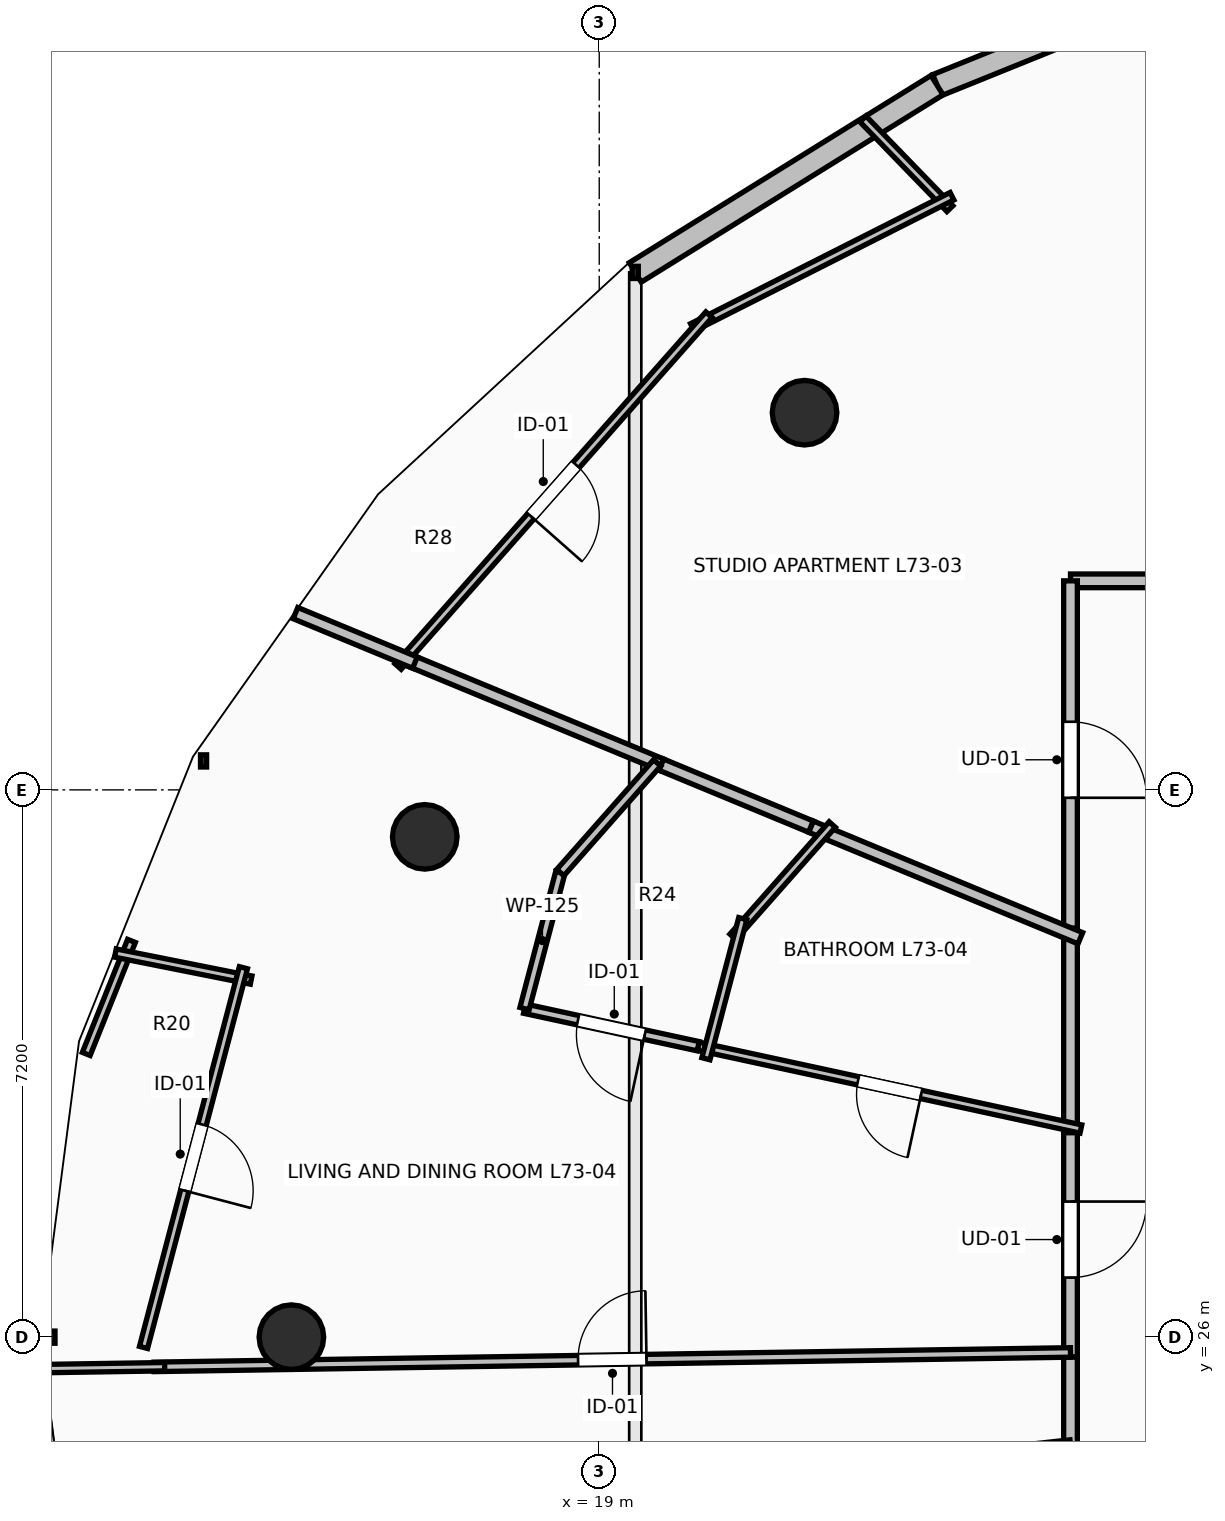
"""IFC4 building model, lengths in metres.
Left out: names, types, materials, properties, quantities, classifications, styles, units other than length and angle.
Written with IfcOpenShell. Run it as: python <this file> out.ifc"""

import sys

from ifc_helpers import new_model, si_unit, direction, frame, frame_2d, origin, origin_2d, place, context, subcontext, project, spatial, rectangle, circle, extrude, element, fill, save


model = new_model("IFC4")
c1 = context("Model", 3, precision=1e-05, world=origin(), true_north=direction((0.0, 1.0)))
c2 = subcontext(c1, "Body", "Model", "MODEL_VIEW")
j1 = project(units=[si_unit("LENGTHUNIT", "METRE"), si_unit("PLANEANGLEUNIT", "RADIAN")], contexts=[c1])
p1 = place(None, origin())
s1 = spatial("IfcSite", under=j1, at=p1, CompositionType="ELEMENT")
p2 = place(p1, origin())
s2 = spatial("IfcBuilding", under=s1, at=p2, CompositionType="ELEMENT")
p3 = place(p2, frame((0.0, 0.0, 269.75)))
s3 = spatial("IfcBuildingStorey", under=s2, at=p3, CompositionType="ELEMENT", Elevation=269.75)
for number, where, z_axis, x_axis in (
    (1, (21.701, 38.162, 0.0), (0.0, 0.0, 1.0), (-0.707, 0.707, 0.0)),
    (2, (16.705, 32.582, 0.0), (0.0, 0.0, 1.0), (-0.924, 0.383, 0.0)),
    (3, (14.95, 26.0, 0.0), (0.0, 0.0, 1.0), (-1.0, 0.0, 0.0)),
):
    element("IfcColumn", number, at=place(p3, frame(where, z_axis=z_axis, x_axis=x_axis)), inside=s3, PredefinedType="COLUMN", context=c2, shape_type="SweptSolid", body=[
        extrude(circle(Radius=0.425, at=origin_2d()), origin(), (0.0, 0.0, 1.0), 3.55),
    ])
p4 = place(p3, frame((27.974, 44.302, 0.0), z_axis=(0.0, 0.0, 1.0), x_axis=(-0.927147375511, -0.374696869594, 0.0)))
e4 = element("IfcWall", 4, at=p4, inside=s3, PredefinedType="STANDARD", context=c2, shape_type="SweptSolid", body=[
    extrude(rectangle(XDim=4.885, YDim=0.3, at=frame_2d((2.443, 0.0))), origin(), (0.0, 0.0, 1.0), 3.29),
])
p5 = place(p3, frame((23.444, 42.471, 0.0), z_axis=(0.0, 0.0, 1.0), x_axis=(-0.849702323036, -0.527262707032, 0.0)))
e5 = element("IfcWall", 5, at=p5, inside=s3, PredefinedType="STANDARD", context=c2, shape_type="SweptSolid", body=[
    extrude(rectangle(XDim=4.672, YDim=0.3, at=frame_2d((2.336, 0.0))), origin(), (0.0, 0.0, 1.0), 3.29),
])
p6 = place(p3, frame((29.006, 35.95, 0.0), z_axis=(0.0, 0.0, 1.0), x_axis=(-1.0, 0.0, 0.0)))
e6 = element("IfcWall", 6, at=p6, inside=s3, PredefinedType="PARTITIONING", context=c2, shape_type="SweptSolid", body=[
    extrude(rectangle(XDim=3.806, YDim=0.18, at=frame_2d((1.903, 0.0))), origin(), (0.0, 0.0, 1.0), 2.482),
])
p7 = place(p3, frame((25.2, 35.95, 0.0), z_axis=(0.0, 0.0, 1.0), x_axis=(0.0, -1.0, 0.0)))
e7 = element("IfcWall", 7, at=p7, inside=s3, PredefinedType="PARTITIONING", context=c2, shape_type="SweptSolid", body=[
    extrude(rectangle(XDim=4.708, YDim=0.18, at=frame_2d((2.354, 0.0))), origin(), (0.0, 0.0, 1.0), 2.482),
])
p8 = place(p7, frame((1.854, 0.0, 0.0)))
e8 = element("IfcOpeningElement", 8, at=p8, cuts=e7, PredefinedType="OPENING", context=c2, shape_type="SweptSolid", body=[
    extrude(rectangle(XDim=1.0, YDim=2.15, at=frame_2d((0.5, 1.075))), frame((0.0, 0.105, 0.0), z_axis=(0.0, -1.0, 0.0), x_axis=(1.0, 0.0, 0.0)), (0.0, 0.0, 1.0), 0.21),
])
p9 = place(p3, frame((25.2, 28.829, 0.0), z_axis=(0.0, 0.0, 1.0), x_axis=(0.0, -1.0, 0.0)))
e9 = element("IfcWall", 9, at=p9, inside=s3, PredefinedType="PARTITIONING", context=c2, shape_type="SweptSolid", body=[
    extrude(rectangle(XDim=3.09, YDim=0.18, at=frame_2d((1.545, 0.0))), origin(), (0.0, 0.0, 1.0), 2.482),
])
p10 = place(p9, frame((1.045, 0.0, 0.0)))
e10 = element("IfcOpeningElement", 10, at=p10, cuts=e9, PredefinedType="OPENING", context=c2, shape_type="SweptSolid", body=[
    extrude(rectangle(XDim=1.0, YDim=2.15, at=frame_2d((0.5, 1.075))), frame((0.0, 0.105, 0.0), z_axis=(0.0, -1.0, 0.0), x_axis=(1.0, 0.0, 0.0)), (0.0, 0.0, 1.0), 0.21),
])
p11 = place(p3, frame((25.2, 31.382, 0.0), z_axis=(0.0, 0.0, 1.0), x_axis=(0.0, -1.0, 0.0)))
e11 = element("IfcWall", 11, at=p11, inside=s3, PredefinedType="PARTITIONING", context=c2, shape_type="SweptSolid", body=[
    extrude(rectangle(XDim=2.693, YDim=0.18, at=frame_2d((1.347, 0.0))), origin(), (0.0, 0.0, 1.0), 2.482),
])
p12 = place(p3, frame((25.2, 25.739, 0.0), z_axis=(0.0, 0.0, 1.0), x_axis=(0.0, -1.0, 0.0)))
e12 = element("IfcWall", 12, at=p12, inside=s3, PredefinedType="PARTITIONING", context=c2, shape_type="SweptSolid", body=[
    extrude(rectangle(XDim=1.212, YDim=0.18, at=frame_2d((0.606, 0.0))), origin(), (0.0, 0.0, 1.0), 3.29),
])
p13 = place(p3, frame((22.469, 42.027, 0.0), z_axis=(0.0, 0.0, 1.0), x_axis=(0.695953252392, -0.718087091156, 0.0)))
e13 = element("IfcWall", 13, at=p13, inside=s3, PredefinedType="PARTITIONING", context=c2, shape_type="SweptSolid", body=[
    extrude(rectangle(XDim=1.644, YDim=0.11, at=frame_2d((0.822, 0.0))), origin(), (0.0, 0.0, 1.0), 3.29),
])
p14 = place(p3, frame((23.641, 41.01, 0.0), z_axis=(0.0, 0.0, 1.0), x_axis=(-0.892414796855, -0.451215946476, 0.0)))
e14 = element("IfcWall", 14, at=p14, inside=s3, PredefinedType="PARTITIONING", context=c2, shape_type="SweptSolid", body=[
    extrude(rectangle(XDim=3.826, YDim=0.11, at=frame_2d((1.913, 0.0))), origin(), (0.0, 0.0, 1.0), 3.29),
])
p15 = place(p3, frame((20.444, 39.452, 0.0), z_axis=(0.0, 0.0, 1.0), x_axis=(-0.662167862663, -0.749355537549, 0.0)))
e15 = element("IfcWall", 15, at=p15, inside=s3, PredefinedType="PARTITIONING", context=c2, shape_type="SweptSolid", body=[
    extrude(rectangle(XDim=6.177, YDim=0.11, at=frame_2d((3.089, 0.0))), origin(), (0.0, 0.0, 1.0), 3.29),
])
p16 = place(p15, frame((2.639, 0.0, 0.0)))
e16 = element("IfcOpeningElement", 16, at=p16, cuts=e15, PredefinedType="OPENING", context=c2, shape_type="SweptSolid", body=[
    extrude(rectangle(XDim=0.9, YDim=2.1, at=frame_2d((0.45, 1.05))), frame((0.0, 0.07, 0.0), z_axis=(0.0, -1.0, 0.0), x_axis=(1.0, 0.0, 0.0)), (0.0, 0.0, 1.0), 0.14),
])
p17 = place(p3, frame((16.446, 34.928, 0.0), z_axis=(0.0, 0.0, 1.0), x_axis=(0.923904292622, -0.3826236507, 0.0)))
e17 = element("IfcWall", 17, at=p17, inside=s3, PredefinedType="PARTITIONING", context=c2, shape_type="SweptSolid", body=[
    extrude(rectangle(XDim=3.648, YDim=0.16, at=frame_2d((1.824, 0.0))), origin(), (0.0, 0.0, 1.0), 2.874),
])
p18 = place(p3, frame((21.785, 32.717, 0.0), z_axis=(0.0, 0.0, 1.0), x_axis=(0.923878783617, -0.382685240352, 0.0)))
e18 = element("IfcWall", 18, at=p18, inside=s3, PredefinedType="PARTITIONING", context=c2, shape_type="SweptSolid", body=[
    extrude(rectangle(XDim=3.837, YDim=0.16, at=frame_2d((1.918, 0.0))), origin(), (0.0, 0.0, 1.0), 2.979),
])
p19 = place(p3, frame((19.817, 33.532, 0.0), z_axis=(0.0, 0.0, 1.0), x_axis=(0.92391905869, -0.382587993786, 0.0)))
e19 = element("IfcWall", 19, at=p19, inside=s3, PredefinedType="PARTITIONING", context=c2, shape_type="SweptSolid", body=[
    extrude(rectangle(XDim=2.13, YDim=0.16, at=frame_2d((1.065, 0.0))), origin(), (0.0, 0.0, 1.0), 2.936),
])
p20 = place(p3, frame((15.004, 35.526, 0.0), z_axis=(0.0, 0.0, 1.0), x_axis=(0.923843638485, -0.382770076719, 0.0)))
e20 = element("IfcWall", 20, at=p20, inside=s3, PredefinedType="PARTITIONING", context=c2, shape_type="SweptSolid", body=[
    extrude(rectangle(XDim=1.701, YDim=0.16, at=frame_2d((0.851, 0.0))), origin(), (0.0, 0.0, 1.0), 3.29),
])
p21 = place(p3, frame((25.337, 28.738, 0.0), z_axis=(0.0, 0.0, 1.0), x_axis=(-0.977382932841, 0.211477191656, 0.0)))
e21 = element("IfcWall", 21, at=p21, inside=s3, PredefinedType="PARTITIONING", context=c2, shape_type="SweptSolid", body=[
    extrude(rectangle(XDim=5.151, YDim=0.11, at=frame_2d((2.576, 0.0))), origin(), (0.0, 0.0, 1.0), 2.482),
])
p22 = place(p21, frame((2.15, 0.0, 0.0)))
e22 = element("IfcOpeningElement", 22, at=p22, cuts=e21, PredefinedType="OPENING", context=c2, shape_type="SweptSolid", body=[
    extrude(rectangle(XDim=0.85, YDim=2.1, at=frame_2d((0.425, 1.05))), frame((0.0, 0.07, 0.0), z_axis=(0.0, -1.0, 0.0), x_axis=(1.0, 0.0, 0.0)), (0.0, 0.0, 1.0), 0.14),
])
p23 = place(p3, frame((12.846, 31.213, 0.0), z_axis=(0.0, 0.0, 1.0), x_axis=(-0.371522095559, -0.928424112414, 0.0)))
e23 = element("IfcWall", 23, at=p23, inside=s3, PredefinedType="PARTITIONING", context=c2, shape_type="SweptSolid", body=[
    extrude(rectangle(XDim=1.602, YDim=0.11, at=frame_2d((0.801, 0.0))), origin(), (0.0, 0.0, 1.0), 3.29),
])
p24 = place(p3, frame((12.635, 31.053, 0.0), z_axis=(0.0, 0.0, 1.0), x_axis=(0.980704252003, -0.195497238094, 0.0)))
e24 = element("IfcWall", 24, at=p24, inside=s3, PredefinedType="PARTITIONING", context=c2, shape_type="SweptSolid", body=[
    extrude(rectangle(XDim=1.821, YDim=0.11, at=frame_2d((0.91, 0.0))), origin(), (0.0, 0.0, 1.0), 3.29),
])
p25 = place(p3, frame((14.319, 30.86, 0.0), z_axis=(0.0, 0.0, 1.0), x_axis=(-0.254404898477, -0.967097796312, 0.0)))
e25 = element("IfcWall", 25, at=p25, inside=s3, PredefinedType="PARTITIONING", context=c2, shape_type="SweptSolid", body=[
    extrude(rectangle(XDim=5.166, YDim=0.11, at=frame_2d((2.583, 0.0))), origin(), (0.0, 0.0, 1.0), 3.29),
])
p26 = place(p25, frame((2.133, 0.0, 0.0)))
e26 = element("IfcOpeningElement", 26, at=p26, cuts=e25, PredefinedType="OPENING", context=c2, shape_type="SweptSolid", body=[
    extrude(rectangle(XDim=0.9, YDim=2.1, at=frame_2d((0.45, 1.05))), frame((0.0, 0.07, 0.0), z_axis=(0.0, -1.0, 0.0), x_axis=(1.0, 0.0, 0.0)), (0.0, 0.0, 1.0), 0.14),
])
p27 = place(p3, frame((20.302, 29.828, 0.0), z_axis=(0.0, 0.0, 1.0), x_axis=(-0.977387924942, 0.211454118377, 0.0)))
e27 = element("IfcWall", 27, at=p27, inside=s3, PredefinedType="PARTITIONING", context=c2, shape_type="SweptSolid", body=[
    extrude(rectangle(XDim=2.338, YDim=0.125, at=frame_2d((1.169, 0.0))), origin(), (0.0, 0.0, 1.0), 2.936),
])
p28 = place(p27, frame((0.719, 0.0, 0.0)))
e28 = element("IfcOpeningElement", 28, at=p28, cuts=e27, PredefinedType="OPENING", context=c2, shape_type="SweptSolid", body=[
    extrude(rectangle(XDim=0.9, YDim=2.1, at=frame_2d((0.45, 1.05))), frame((0.0, 0.077, 0.0), z_axis=(0.0, -1.0, 0.0), x_axis=(1.0, 0.0, 0.0)), (0.0, 0.0, 1.0), 0.155),
])
p29 = place(p3, frame((18.017, 30.322, 0.0), z_axis=(0.0, 0.0, 1.0), x_axis=(0.254434866485, 0.967089912426, 0.0)))
e29 = element("IfcWall", 29, at=p29, inside=s3, PredefinedType="PARTITIONING", context=c2, shape_type="SweptSolid", body=[
    extrude(rectangle(XDim=1.851, YDim=0.125, at=frame_2d((0.926, 0.0))), origin(), (0.0, 0.0, 1.0), 2.482),
])
p30 = place(p3, frame((18.488, 32.112, 0.0), z_axis=(0.0, 0.0, 1.0), x_axis=(0.661856531983, 0.749630529709, 0.0)))
e30 = element("IfcWall", 30, at=p30, inside=s3, PredefinedType="PARTITIONING", context=c2, shape_type="SweptSolid", body=[
    extrude(rectangle(XDim=1.925, YDim=0.125, at=frame_2d((0.962, 0.0))), origin(), (0.0, 0.0, 1.0), 2.482),
])
p31 = place(p3, frame((13.143, 25.609, 0.0), z_axis=(0.0, 0.0, 1.0), x_axis=(0.999875613351, 0.015772058374, 0.0)))
e31 = element("IfcWall", 31, at=p31, inside=s3, PredefinedType="PARTITIONING", context=c2, shape_type="SweptSolid", body=[
    extrude(rectangle(XDim=12.058, YDim=0.125, at=frame_2d((6.029, 0.0))), origin(), (0.0, 0.0, 1.0), 2.874),
])
p32 = place(p31, frame((5.579, 0.0, 0.0)))
e32 = element("IfcOpeningElement", 32, at=p32, cuts=e31, PredefinedType="OPENING", context=c2, shape_type="SweptSolid", body=[
    extrude(rectangle(XDim=0.9, YDim=2.1, at=frame_2d((0.45, 1.05))), frame((0.0, 0.077, 0.0), z_axis=(0.0, -1.0, 0.0), x_axis=(1.0, 0.0, 0.0)), (0.0, 0.0, 1.0), 0.155),
])
p33 = place(p3, frame((22.066, 32.744, 0.0), z_axis=(0.0, 0.0, 1.0), x_axis=(-0.662047420969, -0.749461948593, 0.0)))
e33 = element("IfcWall", 33, at=p33, inside=s3, PredefinedType="PARTITIONING", context=c2, shape_type="SweptSolid", body=[
    extrude(rectangle(XDim=1.972, YDim=0.11, at=frame_2d((0.986, 0.0))), origin(), (0.0, 0.0, 1.0), 2.936),
])
p34 = place(p3, frame((20.889, 31.506, 0.0), z_axis=(0.0, 0.0, 1.0), x_axis=(-0.254568935897, -0.967054629727, 0.0)))
e34 = element("IfcWall", 34, at=p34, inside=s3, PredefinedType="PARTITIONING", context=c2, shape_type="SweptSolid", body=[
    extrude(rectangle(XDim=1.906, YDim=0.11, at=frame_2d((0.953, 0.0))), origin(), (0.0, 0.0, 1.0), 2.482),
])
p35 = place(p3, frame((11.714, 25.587, 0.0), z_axis=(0.0, 0.0, 1.0), x_axis=(0.9998813462, 0.015404334465, 0.0)))
e35 = element("IfcWall", 35, at=p35, inside=s3, PredefinedType="PARTITIONING", context=c2, shape_type="SweptSolid", body=[
    extrude(rectangle(XDim=1.569, YDim=0.11, at=frame_2d((0.785, 0.0))), origin(), (0.0, 0.0, 1.0), 3.29),
])
p36 = place(p3, frame((12.172, 23.149, 0.0), z_axis=(0.0, 0.0, 1.0), x_axis=(0.993963433103, 0.109711866515, 0.0)))
e36 = element("IfcWall", 36, at=p36, inside=s3, PredefinedType="PARTITIONING", context=c2, shape_type="SweptSolid", body=[
    extrude(rectangle(XDim=13.107, YDim=0.125, at=frame_2d((6.553, 0.0))), origin(), (0.0, 0.0, 1.0), 2.874),
])
p37 = place(p8, origin())
e37 = element("IfcDoor", 37, at=p37, inside=s3, OperationType="SINGLE_SWING_RIGHT", PredefinedType="DOOR", context=c2, shape_type="SweptSolid", body=[
    extrude(rectangle(XDim=1.0, YDim=2.15, at=frame_2d((0.5, 1.075))), frame((0.0, 0.025, 0.0), z_axis=(0.0, -1.0, 0.0), x_axis=(1.0, 0.0, 0.0)), (0.0, 0.0, 1.0), 0.05),
])
fill(e8, e37)
p38 = place(p10, origin())
e38 = element("IfcDoor", 38, at=p38, inside=s3, OperationType="SINGLE_SWING_LEFT", PredefinedType="DOOR", context=c2, shape_type="SweptSolid", body=[
    extrude(rectangle(XDim=1.0, YDim=2.15, at=frame_2d((0.5, 1.075))), frame((0.0, 0.025, 0.0), z_axis=(0.0, -1.0, 0.0), x_axis=(1.0, 0.0, 0.0)), (0.0, 0.0, 1.0), 0.05),
])
fill(e10, e38)
p39 = place(p16, origin())
e39 = element("IfcDoor", 39, at=p39, inside=s3, OperationType="SINGLE_SWING_RIGHT", PredefinedType="DOOR", context=c2, shape_type="SweptSolid", body=[
    extrude(rectangle(XDim=0.9, YDim=2.1, at=frame_2d((0.45, 1.05))), frame((0.0, 0.025, 0.0), z_axis=(0.0, -1.0, 0.0), x_axis=(1.0, 0.0, 0.0)), (0.0, 0.0, 1.0), 0.05),
])
fill(e16, e39)
p40 = place(p22, origin())
e40 = element("IfcDoor", 40, at=p40, inside=s3, OperationType="SINGLE_SWING_LEFT", PredefinedType="DOOR", context=c2, shape_type="SweptSolid", body=[
    extrude(rectangle(XDim=0.85, YDim=2.1, at=frame_2d((0.425, 1.05))), frame((0.0, 0.025, 0.0), z_axis=(0.0, -1.0, 0.0), x_axis=(1.0, 0.0, 0.0)), (0.0, 0.0, 1.0), 0.05),
])
fill(e22, e40)
p41 = place(p26, origin())
e41 = element("IfcDoor", 41, at=p41, inside=s3, OperationType="SINGLE_SWING_RIGHT", PredefinedType="DOOR", context=c2, shape_type="SweptSolid", body=[
    extrude(rectangle(XDim=0.9, YDim=2.1, at=frame_2d((0.45, 1.05))), frame((0.0, 0.025, 0.0), z_axis=(0.0, -1.0, 0.0), x_axis=(1.0, 0.0, 0.0)), (0.0, 0.0, 1.0), 0.05),
])
fill(e26, e41)
p42 = place(p28, origin())
e42 = element("IfcDoor", 42, at=p42, inside=s3, OperationType="SINGLE_SWING_LEFT", PredefinedType="DOOR", context=c2, shape_type="SweptSolid", body=[
    extrude(rectangle(XDim=0.9, YDim=2.1, at=frame_2d((0.45, 1.05))), frame((0.0, 0.025, 0.0), z_axis=(0.0, -1.0, 0.0), x_axis=(1.0, 0.0, 0.0)), (0.0, 0.0, 1.0), 0.05),
])
fill(e28, e42)
p43 = place(p32, origin())
e43 = element("IfcDoor", 43, at=p43, inside=s3, OperationType="SINGLE_SWING_RIGHT", PredefinedType="DOOR", context=c2, shape_type="SweptSolid", body=[
    extrude(rectangle(XDim=0.9, YDim=2.1, at=frame_2d((0.45, 1.05))), frame((0.0, 0.025, 0.0), z_axis=(0.0, -1.0, 0.0), x_axis=(1.0, 0.0, 0.0)), (0.0, 0.0, 1.0), 0.05),
])
fill(e32, e43)
save(model, sys.argv[1])
